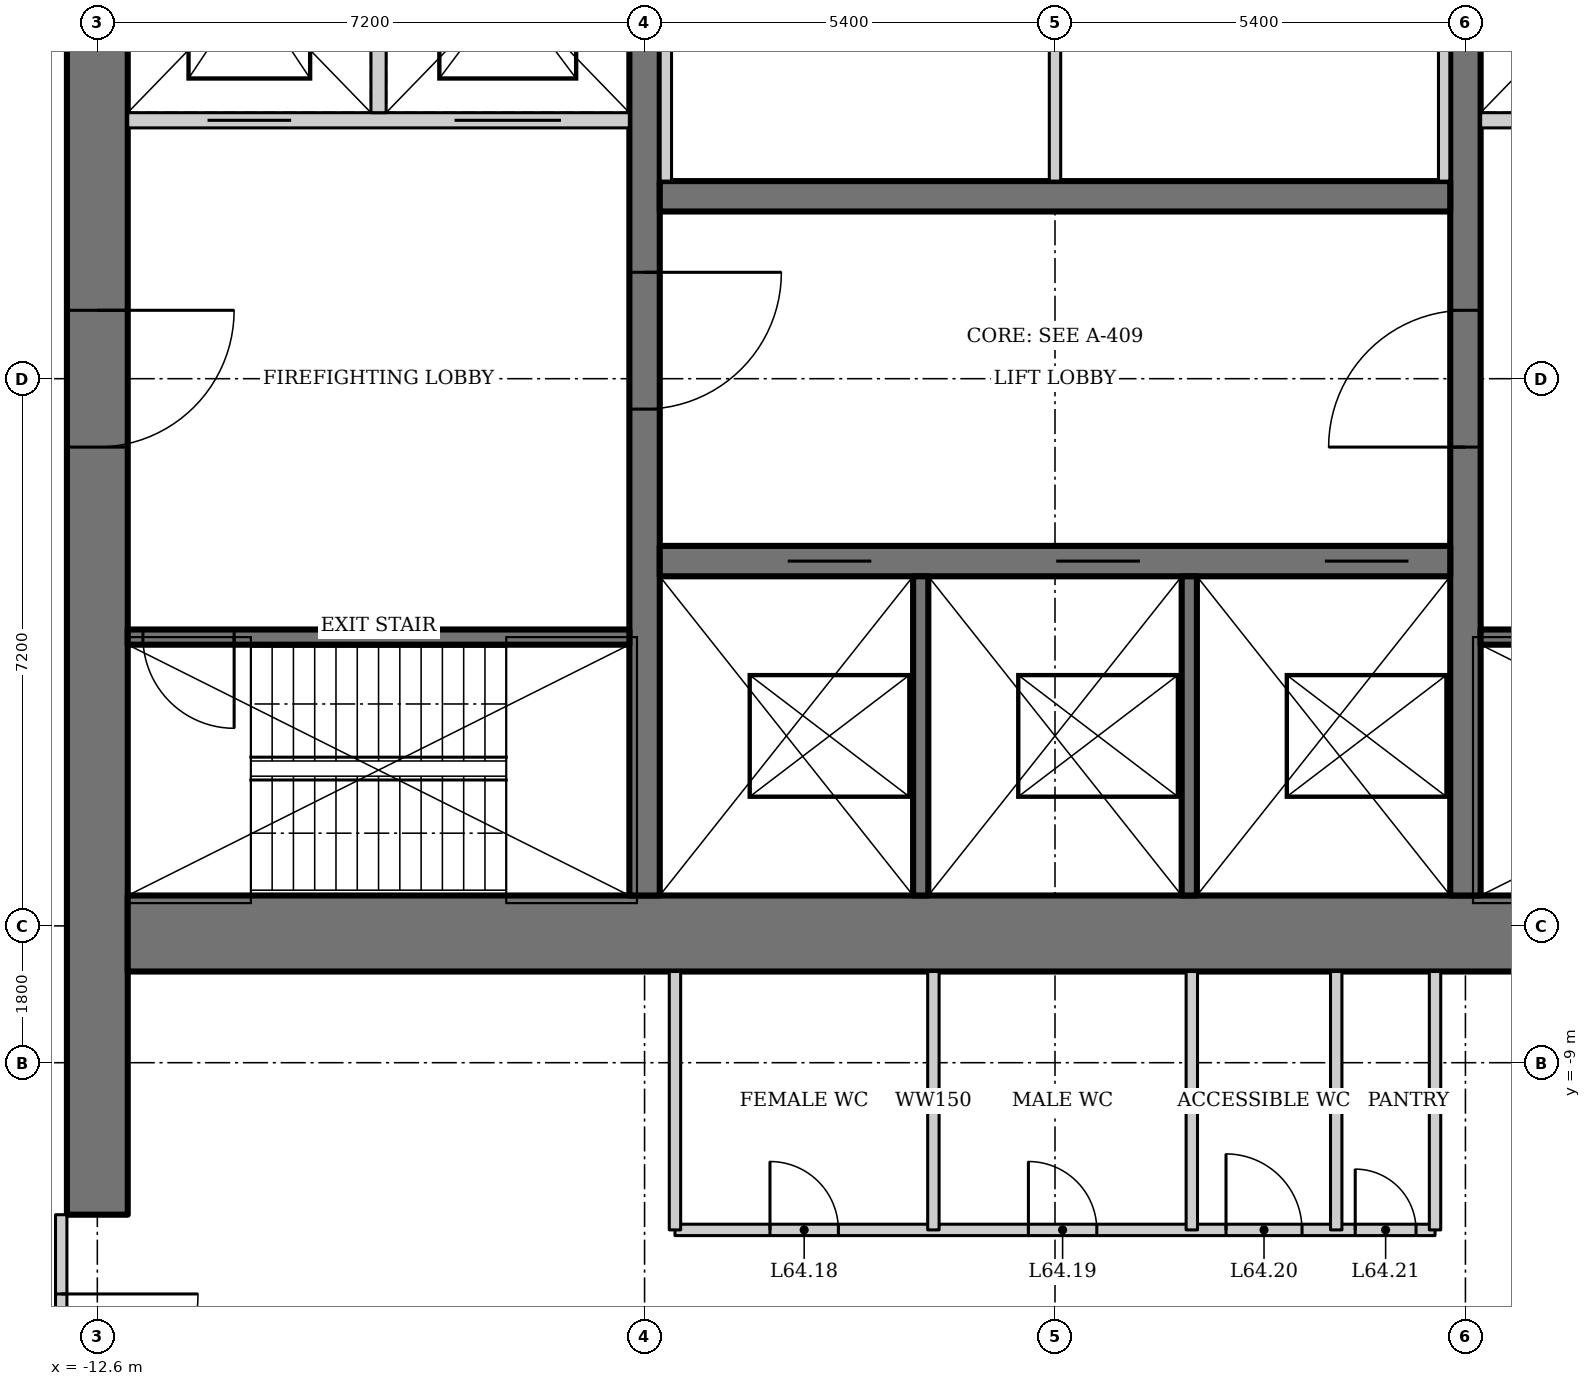
"""IFC4 building model, lengths in metres.
Left out: names, types, materials, properties, quantities, classifications, styles, units other than length and angle.
Written with IfcOpenShell. Run it as: python <this file> out.ifc"""

import sys

from ifc_helpers import new_model, si_unit, direction, frame, frame_2d, origin, place, context, subcontext, project, spatial, rectangle, extrude, element, fill, save


model = new_model("IFC4")
c1 = context("Model", 3, precision=1e-05, world=origin(), true_north=direction((0.0, 1.0)))
c2 = subcontext(c1, "Body", "Model", "MODEL_VIEW")
j1 = project(units=[si_unit("LENGTHUNIT", "METRE"), si_unit("PLANEANGLEUNIT", "RADIAN")], contexts=[c1])
p1 = place(None, origin())
s1 = spatial("IfcSite", under=j1, at=p1, CompositionType="ELEMENT")
p2 = place(p1, origin())
s2 = spatial("IfcBuilding", under=s1, at=p2, CompositionType="ELEMENT")
p3 = place(p2, frame((0.0, 0.0, 274.9)))
s3 = spatial("IfcBuildingStorey", under=s2, at=p3, CompositionType="ELEMENT", Elevation=274.9)
p4 = place(p3, frame((-12.6, 11.0, 0.0), z_axis=(0.0, 0.0, 1.0), x_axis=(0.0, -1.0, 0.0)))
e1 = element("IfcWall", 1, at=p4, inside=s3, PredefinedType="SHEAR", context=c2, shape_type="SweptSolid", body=[
    extrude(rectangle(XDim=22.0, YDim=0.8, at=frame_2d((11.0, 0.0))), origin(), (0.0, 0.0, 1.0), 4.5),
])
p5 = place(p4, frame((10.1, 0.0, 0.0)))
e2 = element("IfcOpeningElement", 2, at=p5, cuts=e1, PredefinedType="OPENING", context=c2, shape_type="SweptSolid", body=[
    extrude(rectangle(XDim=1.8, YDim=2.1, at=frame_2d((0.9, 1.05))), frame((0.0, 0.41, 0.0), z_axis=(0.0, -1.0, 0.0), x_axis=(1.0, 0.0, 0.0)), (0.0, 0.0, 1.0), 0.82),
])
p6 = place(p3, frame((-12.2, -7.3, 0.0), z_axis=(0.0, 0.0, 1.0), x_axis=(1.0, 0.0, 0.0)))
e3 = element("IfcWall", 3, at=p6, inside=s3, PredefinedType="SHEAR", context=c2, shape_type="SweptSolid", body=[
    extrude(rectangle(XDim=24.4, YDim=1.0, at=frame_2d((12.2, 0.0))), origin(), (0.0, 0.0, 1.0), 4.5),
])
p7 = place(p3, frame((5.4, -6.8, 0.0), z_axis=(0.0, 0.0, 1.0), x_axis=(0.0, 1.0, 0.0)))
e4 = element("IfcWall", 4, at=p7, inside=s3, PredefinedType="SHEAR", context=c2, shape_type="SweptSolid", body=[
    extrude(rectangle(XDim=14.6, YDim=0.4, at=frame_2d((7.3, 0.0))), origin(), (0.0, 0.0, 1.0), 4.5),
])
p8 = place(p7, frame((5.9, 0.0, 0.0)))
e5 = element("IfcOpeningElement", 5, at=p8, cuts=e4, PredefinedType="OPENING", context=c2, shape_type="SweptSolid", body=[
    extrude(rectangle(XDim=1.8, YDim=2.1, at=frame_2d((0.9, 1.05))), frame((0.0, 0.21, 0.0), z_axis=(0.0, -1.0, 0.0), x_axis=(1.0, 0.0, 0.0)), (0.0, 0.0, 1.0), 0.42),
])
p9 = place(p3, frame((-5.4, 7.8, 0.0), z_axis=(0.0, 0.0, 1.0), x_axis=(0.0, -1.0, 0.0)))
e6 = element("IfcWall", 6, at=p9, inside=s3, PredefinedType="SHEAR", context=c2, shape_type="SweptSolid", body=[
    extrude(rectangle(XDim=14.6, YDim=0.4, at=frame_2d((7.3, 0.0))), origin(), (0.0, 0.0, 1.0), 4.5),
])
p10 = place(p9, frame((6.4, 0.0, 0.0)))
e7 = element("IfcOpeningElement", 7, at=p10, cuts=e6, PredefinedType="OPENING", context=c2, shape_type="SweptSolid", body=[
    extrude(rectangle(XDim=1.8, YDim=2.1, at=frame_2d((0.9, 1.05))), frame((0.0, 0.21, 0.0), z_axis=(0.0, -1.0, 0.0), x_axis=(1.0, 0.0, 0.0)), (0.0, 0.0, 1.0), 0.42),
])
p11 = place(p3, frame((-5.2, -2.4, 0.0), z_axis=(0.0, 0.0, 1.0), x_axis=(1.0, 0.0, 0.0)))
e8 = element("IfcWall", 8, at=p11, inside=s3, PredefinedType="SHEAR", context=c2, shape_type="SweptSolid", body=[
    extrude(rectangle(XDim=10.4, YDim=0.4, at=frame_2d((5.2, 0.0))), origin(), (0.0, 0.0, 1.0), 4.5),
])
p12 = place(p11, frame((1.683, 0.0, 0.0)))
e9 = element("IfcOpeningElement", 9, at=p12, cuts=e8, PredefinedType="OPENING", context=c2, shape_type="SweptSolid", body=[
    extrude(rectangle(XDim=1.1, YDim=2.2, at=frame_2d((0.55, 1.1))), frame((0.0, 0.21, 0.0), z_axis=(0.0, -1.0, 0.0), x_axis=(1.0, 0.0, 0.0)), (0.0, 0.0, 1.0), 0.42),
])
p13 = place(p11, frame((5.217, 0.0, 0.0)))
e10 = element("IfcOpeningElement", 10, at=p13, cuts=e8, PredefinedType="OPENING", context=c2, shape_type="SweptSolid", body=[
    extrude(rectangle(XDim=1.1, YDim=2.2, at=frame_2d((0.55, 1.1))), frame((0.0, 0.21, 0.0), z_axis=(0.0, -1.0, 0.0), x_axis=(1.0, 0.0, 0.0)), (0.0, 0.0, 1.0), 0.42),
])
p14 = place(p11, frame((8.75, 0.0, 0.0)))
e11 = element("IfcOpeningElement", 11, at=p14, cuts=e8, PredefinedType="OPENING", context=c2, shape_type="SweptSolid", body=[
    extrude(rectangle(XDim=1.1, YDim=2.2, at=frame_2d((0.55, 1.1))), frame((0.0, 0.21, 0.0), z_axis=(0.0, -1.0, 0.0), x_axis=(1.0, 0.0, 0.0)), (0.0, 0.0, 1.0), 0.42),
])
for number, where, z_axis, x_axis in (
    (12, (-1.767, -2.6, 0.0), (0.0, 0.0, 1.0), (0.0, -1.0, 0.0)),
    (13, (1.767, -2.6, 0.0), (0.0, 0.0, 1.0), (0.0, -1.0, 0.0)),
):
    element("IfcWall", number, at=place(p3, frame(where, z_axis=z_axis, x_axis=x_axis)), inside=s3, PredefinedType="SOLIDWALL", context=c2, shape_type="SweptSolid", body=[
        extrude(rectangle(XDim=4.2, YDim=0.2, at=frame_2d((2.1, 0.0))), origin(), (0.0, 0.0, 1.0), 4.5),
    ])
p15 = place(p3, frame((5.2, 2.4, 0.0), z_axis=(0.0, 0.0, 1.0), x_axis=(-1.0, 0.0, 0.0)))
e14 = element("IfcWall", 14, at=p15, inside=s3, PredefinedType="SHEAR", context=c2, shape_type="SweptSolid", body=[
    extrude(rectangle(XDim=10.4, YDim=0.4, at=frame_2d((5.2, 0.0))), origin(), (0.0, 0.0, 1.0), 4.5),
])
p16 = place(p3, frame((5.6, -3.4, 0.0), z_axis=(0.0, 0.0, 1.0), x_axis=(1.0, 0.0, 0.0)))
e15 = element("IfcWall", 15, at=p16, inside=s3, PredefinedType="SHEAR", context=c2, shape_type="SweptSolid", body=[
    extrude(rectangle(XDim=6.6, YDim=0.2, at=frame_2d((3.3, 0.0))), origin(), (0.0, 0.0, 1.0), 4.5),
])
p17 = place(p16, frame((5.2, 0.0, 0.0)))
e16 = element("IfcOpeningElement", 16, at=p17, cuts=e15, PredefinedType="OPENING", context=c2, shape_type="SweptSolid", body=[
    extrude(rectangle(XDim=1.2, YDim=2.1, at=frame_2d((0.6, 1.05))), frame((0.0, 0.11, 0.0), z_axis=(0.0, -1.0, 0.0), x_axis=(1.0, 0.0, 0.0)), (0.0, 0.0, 1.0), 0.22),
])
p18 = place(p3, frame((12.2, 3.4, 0.0), z_axis=(0.0, 0.0, 1.0), x_axis=(-1.0, 0.0, 0.0)))
e17 = element("IfcWall", 17, at=p18, inside=s3, PredefinedType="SOLIDWALL", context=c2, shape_type="SweptSolid", body=[
    extrude(rectangle(XDim=6.6, YDim=0.2, at=frame_2d((3.3, 0.0))), origin(), (0.0, 0.0, 1.0), 4.5),
])
p19 = place(p18, frame((4.45, 0.0, 0.0)))
e18 = element("IfcOpeningElement", 18, at=p19, cuts=e17, PredefinedType="OPENING", context=c2, shape_type="SweptSolid", body=[
    extrude(rectangle(XDim=1.1, YDim=2.2, at=frame_2d((0.55, 1.1))), frame((0.0, 0.11, 0.0), z_axis=(0.0, -1.0, 0.0), x_axis=(1.0, 0.0, 0.0)), (0.0, 0.0, 1.0), 0.22),
])
p20 = place(p18, frame((0.9, 0.0, 0.0)))
e19 = element("IfcOpeningElement", 19, at=p20, cuts=e17, PredefinedType="OPENING", context=c2, shape_type="SweptSolid", body=[
    extrude(rectangle(XDim=1.4, YDim=2.2, at=frame_2d((0.7, 1.1))), frame((0.0, 0.11, 0.0), z_axis=(0.0, -1.0, 0.0), x_axis=(1.0, 0.0, 0.0)), (0.0, 0.0, 1.0), 0.22),
])
p21 = place(p3, frame((-5.6, -3.4, 0.0), z_axis=(0.0, 0.0, 1.0), x_axis=(-1.0, 0.0, 0.0)))
e20 = element("IfcWall", 20, at=p21, inside=s3, PredefinedType="SHEAR", context=c2, shape_type="SweptSolid", body=[
    extrude(rectangle(XDim=6.6, YDim=0.2, at=frame_2d((3.3, 0.0))), origin(), (0.0, 0.0, 1.0), 4.5),
])
p22 = place(p21, frame((5.2, 0.0, 0.0)))
e21 = element("IfcOpeningElement", 21, at=p22, cuts=e20, PredefinedType="OPENING", context=c2, shape_type="SweptSolid", body=[
    extrude(rectangle(XDim=1.2, YDim=2.1, at=frame_2d((0.6, 1.05))), frame((0.0, 0.11, 0.0), z_axis=(0.0, -1.0, 0.0), x_axis=(1.0, 0.0, 0.0)), (0.0, 0.0, 1.0), 0.22),
])
p23 = place(p3, frame((-12.2, 3.4, 0.0), z_axis=(0.0, 0.0, 1.0), x_axis=(1.0, 0.0, 0.0)))
e22 = element("IfcWall", 22, at=p23, inside=s3, PredefinedType="SOLIDWALL", context=c2, shape_type="SweptSolid", body=[
    extrude(rectangle(XDim=6.6, YDim=0.2, at=frame_2d((3.3, 0.0))), origin(), (0.0, 0.0, 1.0), 4.5),
])
p24 = place(p23, frame((1.05, 0.0, 0.0)))
e23 = element("IfcOpeningElement", 23, at=p24, cuts=e22, PredefinedType="OPENING", context=c2, shape_type="SweptSolid", body=[
    extrude(rectangle(XDim=1.1, YDim=2.2, at=frame_2d((0.55, 1.1))), frame((0.0, 0.11, 0.0), z_axis=(0.0, -1.0, 0.0), x_axis=(1.0, 0.0, 0.0)), (0.0, 0.0, 1.0), 0.22),
])
p25 = place(p23, frame((4.3, 0.0, 0.0)))
e24 = element("IfcOpeningElement", 24, at=p25, cuts=e22, PredefinedType="OPENING", context=c2, shape_type="SweptSolid", body=[
    extrude(rectangle(XDim=1.4, YDim=2.2, at=frame_2d((0.7, 1.1))), frame((0.0, 0.11, 0.0), z_axis=(0.0, -1.0, 0.0), x_axis=(1.0, 0.0, 0.0)), (0.0, 0.0, 1.0), 0.22),
])
p26 = place(p3, frame((-8.9, 3.5, 0.0), z_axis=(0.0, 0.0, 1.0), x_axis=(0.0, 1.0, 0.0)))
e25 = element("IfcWall", 25, at=p26, inside=s3, PredefinedType="SOLIDWALL", context=c2, shape_type="SweptSolid", body=[
    extrude(rectangle(XDim=3.3, YDim=0.2, at=frame_2d((1.65, 0.0))), origin(), (0.0, 0.0, 1.0), 4.5),
])
p27 = place(p3, frame((-13.075, -11.0, 0.0), z_axis=(0.0, 0.0, 1.0), x_axis=(0.0, -1.0, 0.0)))
e26 = element("IfcWall", 26, at=p27, inside=s3, PredefinedType="PARTITIONING", context=c2, shape_type="SweptSolid", body=[
    extrude(rectangle(XDim=4.974, YDim=0.15, at=frame_2d((2.487, 0.0))), origin(), (0.0, 0.0, 1.0), 4.35),
])
p28 = place(p27, frame((1.043, 0.0, 0.0)))
e27 = element("IfcOpeningElement", 27, at=p28, cuts=e26, PredefinedType="OPENING", context=c2, shape_type="SweptSolid", body=[
    extrude(rectangle(XDim=1.8, YDim=2.1, at=frame_2d((0.9, 1.05))), frame((0.0, 0.085, 0.0), z_axis=(0.0, -1.0, 0.0), x_axis=(1.0, 0.0, 0.0)), (0.0, 0.0, 1.0), 0.17),
])
p29 = place(p3, frame((-5.0, -11.2, 0.0), z_axis=(0.0, 0.0, 1.0), x_axis=(1.0, 0.0, 0.0)))
e28 = element("IfcWall", 28, at=p29, inside=s3, PredefinedType="SOLIDWALL", context=c2, shape_type="SweptSolid", body=[
    extrude(rectangle(XDim=10.0, YDim=0.15, at=frame_2d((5.0, 0.0))), origin(), (0.0, 0.0, 1.0), 4.35),
])
p30 = place(p29, frame((1.25, 0.0, 0.0)))
e29 = element("IfcOpeningElement", 29, at=p30, cuts=e28, PredefinedType="OPENING", context=c2, shape_type="SweptSolid", body=[
    extrude(rectangle(XDim=0.9, YDim=2.1, at=frame_2d((0.45, 1.05))), frame((0.0, 0.085, 0.0), z_axis=(0.0, -1.0, 0.0), x_axis=(1.0, 0.0, 0.0)), (0.0, 0.0, 1.0), 0.17),
])
p31 = place(p29, frame((4.65, 0.0, 0.0)))
e30 = element("IfcOpeningElement", 30, at=p31, cuts=e28, PredefinedType="OPENING", context=c2, shape_type="SweptSolid", body=[
    extrude(rectangle(XDim=0.9, YDim=2.1, at=frame_2d((0.45, 1.05))), frame((0.0, 0.085, 0.0), z_axis=(0.0, -1.0, 0.0), x_axis=(1.0, 0.0, 0.0)), (0.0, 0.0, 1.0), 0.17),
])
p32 = place(p29, frame((7.25, 0.0, 0.0)))
e31 = element("IfcOpeningElement", 31, at=p32, cuts=e28, PredefinedType="OPENING", context=c2, shape_type="SweptSolid", body=[
    extrude(rectangle(XDim=1.0, YDim=2.1, at=frame_2d((0.5, 1.05))), frame((0.0, 0.085, 0.0), z_axis=(0.0, -1.0, 0.0), x_axis=(1.0, 0.0, 0.0)), (0.0, 0.0, 1.0), 0.17),
])
p33 = place(p29, frame((8.95, 0.0, 0.0)))
e32 = element("IfcOpeningElement", 32, at=p33, cuts=e28, PredefinedType="OPENING", context=c2, shape_type="SweptSolid", body=[
    extrude(rectangle(XDim=0.8, YDim=2.1, at=frame_2d((0.4, 1.05))), frame((0.0, 0.085, 0.0), z_axis=(0.0, -1.0, 0.0), x_axis=(1.0, 0.0, 0.0)), (0.0, 0.0, 1.0), 0.17),
])
for number, where, z_axis, x_axis in (
    (33, (-5.0, -7.8, 0.0), (0.0, 0.0, 1.0), (0.0, -1.0, 0.0)),
    (34, (5.0, -7.8, 0.0), (0.0, 0.0, 1.0), (0.0, -1.0, 0.0)),
    (35, (-1.6, -7.8, 0.0), (0.0, 0.0, 1.0), (0.0, -1.0, 0.0)),
):
    element("IfcWall", number, at=place(p3, frame(where, z_axis=z_axis, x_axis=x_axis)), inside=s3, PredefinedType="SOLIDWALL", context=c2, shape_type="SweptSolid", body=[
        extrude(rectangle(XDim=3.4, YDim=0.15, at=frame_2d((1.7, 0.0))), origin(), (0.0, 0.0, 1.0), 4.35),
    ])
p34 = place(p3, frame((1.8, -7.8, 0.0), z_axis=(0.0, 0.0, 1.0), x_axis=(0.0, -1.0, 0.0)))
e36 = element("IfcWall", 36, at=p34, inside=s3, PredefinedType="SOLIDWALL", context=c2, shape_type="SweptSolid", body=[
    extrude(rectangle(XDim=3.4, YDim=0.15, at=frame_2d((1.7, 0.0))), origin(), (0.0, 0.0, 1.0), 3.593),
])
p35 = place(p3, frame((3.7, -7.8, 0.0), z_axis=(0.0, 0.0, 1.0), x_axis=(0.0, -1.0, 0.0)))
e37 = element("IfcWall", 37, at=p35, inside=s3, PredefinedType="SOLIDWALL", context=c2, shape_type="SweptSolid", body=[
    extrude(rectangle(XDim=3.4, YDim=0.15, at=frame_2d((1.7, 0.0))), origin(), (0.0, 0.0, 1.0), 4.35),
])
for number, where, z_axis, x_axis in (
    (38, (-5.12, 2.6, 0.0), (0.0, 0.0, 1.0), (0.0, 1.0, 0.0)),
    (39, (5.12, 2.6, 0.0), (0.0, 0.0, 1.0), (0.0, 1.0, 0.0)),
):
    element("IfcWall", number, at=place(p3, frame(where, z_axis=z_axis, x_axis=x_axis)), inside=s3, PredefinedType="PARTITIONING", context=c2, shape_type="SweptSolid", body=[
        extrude(rectangle(XDim=5.2, YDim=0.15, at=frame_2d((2.6, 0.0))), origin(), (0.0, 0.0, 1.0), 4.35),
    ])
p36 = place(p3, frame((0.0, 2.6, 0.0), z_axis=(0.0, 0.0, 1.0), x_axis=(0.0, 1.0, 0.0)))
e40 = element("IfcWall", 40, at=p36, inside=s3, PredefinedType="PARTITIONING", context=c2, shape_type="SweptSolid", body=[
    extrude(rectangle(XDim=5.2, YDim=0.15, at=frame_2d((2.6, 0.0))), origin(), (0.0, 0.0, 1.0), 3.944),
])
p37 = place(p8, origin())
e41 = element("IfcDoor", 41, at=p37, inside=s3, OperationType="DOUBLE_DOOR_DOUBLE_SWING", PredefinedType="DOOR", context=c2, shape_type="SweptSolid", body=[
    extrude(rectangle(XDim=1.8, YDim=2.1, at=frame_2d((0.9, 1.05))), frame((0.0, 0.025, 0.0), z_axis=(0.0, -1.0, 0.0), x_axis=(1.0, 0.0, 0.0)), (0.0, 0.0, 1.0), 0.05),
])
fill(e5, e41)
p38 = place(p10, origin())
e42 = element("IfcDoor", 42, at=p38, inside=s3, OperationType="DOUBLE_DOOR_DOUBLE_SWING", PredefinedType="DOOR", context=c2, shape_type="SweptSolid", body=[
    extrude(rectangle(XDim=1.8, YDim=2.1, at=frame_2d((0.9, 1.05))), frame((0.0, 0.025, 0.0), z_axis=(0.0, -1.0, 0.0), x_axis=(1.0, 0.0, 0.0)), (0.0, 0.0, 1.0), 0.05),
])
fill(e7, e42)
p39 = place(p22, origin())
e43 = element("IfcDoor", 43, at=p39, inside=s3, OperationType="SINGLE_SWING_RIGHT", PredefinedType="DOOR", context=c2, shape_type="SweptSolid", body=[
    extrude(rectangle(XDim=1.2, YDim=2.1, at=frame_2d((0.6, 1.05))), frame((0.0, 0.025, 0.0), z_axis=(0.0, -1.0, 0.0), x_axis=(1.0, 0.0, 0.0)), (0.0, 0.0, 1.0), 0.05),
])
fill(e21, e43)
p40 = place(p5, origin())
e44 = element("IfcDoor", 44, at=p40, inside=s3, OperationType="DOUBLE_DOOR_DOUBLE_SWING", PredefinedType="DOOR", context=c2, shape_type="SweptSolid", body=[
    extrude(rectangle(XDim=1.8, YDim=2.1, at=frame_2d((0.9, 1.05))), frame((0.0, 0.025, 0.0), z_axis=(0.0, -1.0, 0.0), x_axis=(1.0, 0.0, 0.0)), (0.0, 0.0, 1.0), 0.05),
])
fill(e2, e44)
p41 = place(p12, origin())
e45 = element("IfcDoor", 45, at=p41, inside=s3, OperationType="DOUBLE_DOOR_SLIDING", PredefinedType="DOOR", context=c2, shape_type="SweptSolid", body=[
    extrude(rectangle(XDim=1.1, YDim=2.2, at=frame_2d((0.55, 1.1))), frame((0.0, 0.025, 0.0), z_axis=(0.0, -1.0, 0.0), x_axis=(1.0, 0.0, 0.0)), (0.0, 0.0, 1.0), 0.05),
])
fill(e9, e45)
p42 = place(p13, origin())
e46 = element("IfcDoor", 46, at=p42, inside=s3, OperationType="DOUBLE_DOOR_SLIDING", PredefinedType="DOOR", context=c2, shape_type="SweptSolid", body=[
    extrude(rectangle(XDim=1.1, YDim=2.2, at=frame_2d((0.55, 1.1))), frame((0.0, 0.025, 0.0), z_axis=(0.0, -1.0, 0.0), x_axis=(1.0, 0.0, 0.0)), (0.0, 0.0, 1.0), 0.05),
])
fill(e10, e46)
p43 = place(p14, origin())
e47 = element("IfcDoor", 47, at=p43, inside=s3, OperationType="DOUBLE_DOOR_SLIDING", PredefinedType="DOOR", context=c2, shape_type="SweptSolid", body=[
    extrude(rectangle(XDim=1.1, YDim=2.2, at=frame_2d((0.55, 1.1))), frame((0.0, 0.025, 0.0), z_axis=(0.0, -1.0, 0.0), x_axis=(1.0, 0.0, 0.0)), (0.0, 0.0, 1.0), 0.05),
])
fill(e11, e47)
p44 = place(p24, origin())
e48 = element("IfcDoor", 48, at=p44, inside=s3, OperationType="DOUBLE_DOOR_SLIDING", PredefinedType="DOOR", context=c2, shape_type="SweptSolid", body=[
    extrude(rectangle(XDim=1.1, YDim=2.2, at=frame_2d((0.55, 1.1))), frame((0.0, 0.025, 0.0), z_axis=(0.0, -1.0, 0.0), x_axis=(1.0, 0.0, 0.0)), (0.0, 0.0, 1.0), 0.05),
])
fill(e23, e48)
p45 = place(p25, origin())
e49 = element("IfcDoor", 49, at=p45, inside=s3, OperationType="DOUBLE_DOOR_SLIDING", PredefinedType="DOOR", context=c2, shape_type="SweptSolid", body=[
    extrude(rectangle(XDim=1.4, YDim=2.2, at=frame_2d((0.7, 1.1))), frame((0.0, 0.025, 0.0), z_axis=(0.0, -1.0, 0.0), x_axis=(1.0, 0.0, 0.0)), (0.0, 0.0, 1.0), 0.05),
])
fill(e24, e49)
p46 = place(p30, origin())
e50 = element("IfcDoor", 50, at=p46, inside=s3, OperationType="SINGLE_SWING_LEFT", PredefinedType="DOOR", context=c2, shape_type="SweptSolid", body=[
    extrude(rectangle(XDim=0.9, YDim=2.1, at=frame_2d((0.45, 1.05))), frame((0.0, 0.025, 0.0), z_axis=(0.0, -1.0, 0.0), x_axis=(1.0, 0.0, 0.0)), (0.0, 0.0, 1.0), 0.05),
])
fill(e29, e50)
p47 = place(p31, origin())
e51 = element("IfcDoor", 51, at=p47, inside=s3, OperationType="SINGLE_SWING_LEFT", PredefinedType="DOOR", context=c2, shape_type="SweptSolid", body=[
    extrude(rectangle(XDim=0.9, YDim=2.1, at=frame_2d((0.45, 1.05))), frame((0.0, 0.025, 0.0), z_axis=(0.0, -1.0, 0.0), x_axis=(1.0, 0.0, 0.0)), (0.0, 0.0, 1.0), 0.05),
])
fill(e30, e51)
p48 = place(p32, origin())
e52 = element("IfcDoor", 52, at=p48, inside=s3, OperationType="SINGLE_SWING_LEFT", PredefinedType="DOOR", context=c2, shape_type="SweptSolid", body=[
    extrude(rectangle(XDim=1.0, YDim=2.1, at=frame_2d((0.5, 1.05))), frame((0.0, 0.025, 0.0), z_axis=(0.0, -1.0, 0.0), x_axis=(1.0, 0.0, 0.0)), (0.0, 0.0, 1.0), 0.05),
])
fill(e31, e52)
p49 = place(p33, origin())
e53 = element("IfcDoor", 53, at=p49, inside=s3, OperationType="SINGLE_SWING_LEFT", PredefinedType="DOOR", context=c2, shape_type="SweptSolid", body=[
    extrude(rectangle(XDim=0.8, YDim=2.1, at=frame_2d((0.4, 1.05))), frame((0.0, 0.025, 0.0), z_axis=(0.0, -1.0, 0.0), x_axis=(1.0, 0.0, 0.0)), (0.0, 0.0, 1.0), 0.05),
])
fill(e32, e53)
p50 = place(p28, origin())
e54 = element("IfcDoor", 54, at=p50, inside=s3, OperationType="DOUBLE_DOOR_DOUBLE_SWING", PredefinedType="DOOR", context=c2, shape_type="SweptSolid", body=[
    extrude(rectangle(XDim=1.8, YDim=2.1, at=frame_2d((0.9, 1.05))), frame((0.0, 0.025, 0.0), z_axis=(0.0, -1.0, 0.0), x_axis=(1.0, 0.0, 0.0)), (0.0, 0.0, 1.0), 0.05),
])
fill(e27, e54)
save(model, sys.argv[1])
